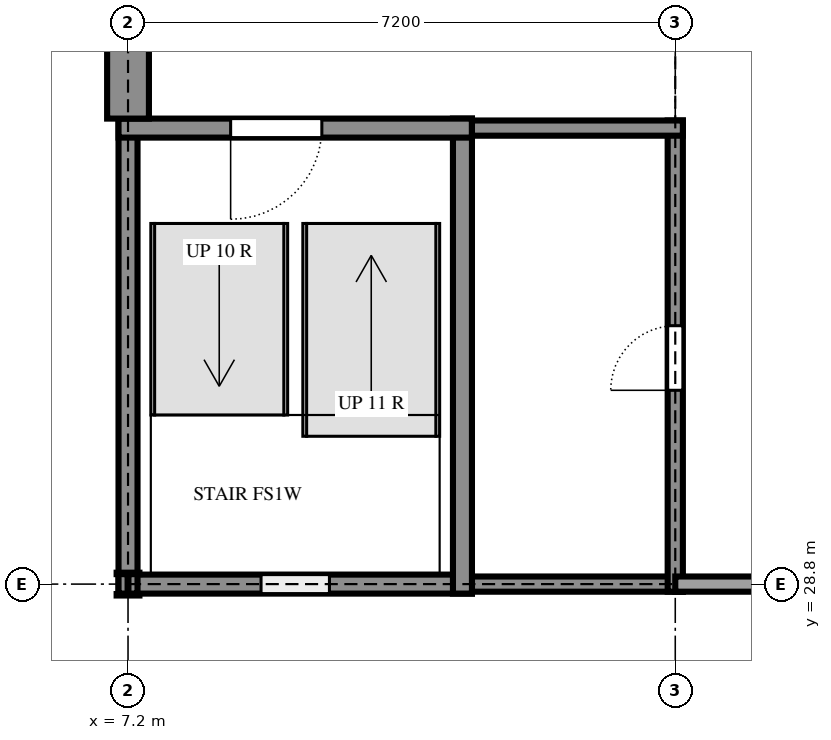
"""IFC4 building model, lengths in metres.
Left out: names, types, materials, properties, quantities, classifications, styles, units other than length and angle.
Written with IfcOpenShell. Run it as: python <this file> out.ifc"""

import sys

from ifc_helpers import new_model, si_unit, direction, frame, frame_2d, origin, origin_2d, place, context, subcontext, project, spatial, rectangle, i_section, extrude, element, fill, save


model = new_model("IFC4")
c1 = context("Model", 3, precision=1e-05, world=origin(), true_north=direction((0.0, 1.0)))
c2 = subcontext(c1, "Body", "Model", "MODEL_VIEW")
j1 = project(units=[si_unit("LENGTHUNIT", "METRE"), si_unit("PLANEANGLEUNIT", "RADIAN")], contexts=[c1])
p1 = place(None, origin())
s1 = spatial("IfcSite", under=j1, at=p1, CompositionType="ELEMENT")
p2 = place(p1, origin())
s2 = spatial("IfcBuilding", under=s1, at=p2, CompositionType="ELEMENT")
p3 = place(p2, frame((0.0, 0.0, 3.6)))
s3 = spatial("IfcBuildingStorey", under=s2, at=p3, CompositionType="ELEMENT", Elevation=3.6)
p4 = place(p3, frame((7.2, 28.8, 0.0), z_axis=(0.0, 0.0, 1.0), x_axis=(1.0, 0.0, 0.0)))
e1 = element("IfcColumn", 1, at=p4, inside=s3, PredefinedType="COLUMN", context=c2, shape_type="SweptSolid", body=[
    extrude(i_section(OverallWidth=0.3, OverallDepth=0.3, WebThickness=0.011, FlangeThickness=0.019, FilletRadius=0.027, at=origin_2d()), origin(), (0.0, 0.0, 1.0), 3.6),
])
p5 = place(p3, frame((7.075, 28.8, 0.0), z_axis=(0.0, 0.0, 1.0), x_axis=(1.0, 0.0, 0.0)))
e2 = element("IfcWall", 2, at=p5, inside=s3, PredefinedType="SHEAR", context=c2, shape_type="SweptSolid", body=[
    extrude(rectangle(XDim=4.65, YDim=0.25, at=frame_2d((2.325, 0.0))), origin(), (0.0, 0.0, 1.0), 3.6),
])
p6 = place(p5, frame((1.875, 0.0, 0.6)))
e3 = element("IfcOpeningElement", 3, at=p6, cuts=e2, PredefinedType="OPENING", context=c2, shape_type="SweptSolid", body=[
    extrude(rectangle(XDim=0.9, YDim=2.1, at=frame_2d((0.45, 1.05))), frame((0.0, 0.135, 0.0), z_axis=(0.0, -1.0, 0.0), x_axis=(1.0, 0.0, 0.0)), (0.0, 0.0, 1.0), 0.27),
])
p7 = place(p3, frame((11.725, 28.8, 0.0), z_axis=(0.0, 0.0, 1.0), x_axis=(1.0, 0.0, 0.0)))
e4 = element("IfcWall", 4, at=p7, inside=s3, PredefinedType="SHEAR", context=c2, shape_type="SweptSolid", body=[
    extrude(rectangle(XDim=2.775, YDim=0.2, at=frame_2d((1.387, 0.0))), origin(), (0.0, 0.0, 1.0), 3.6),
])
p8 = place(p3, frame((11.6, 28.675, 0.0), z_axis=(0.0, 0.0, 1.0), x_axis=(0.0, 1.0, 0.0)))
e5 = element("IfcWall", 5, at=p8, inside=s3, PredefinedType="SHEAR", context=c2, shape_type="SweptSolid", body=[
    extrude(rectangle(XDim=6.25, YDim=0.25, at=frame_2d((3.125, 0.0))), origin(), (0.0, 0.0, 1.0), 3.6),
])
p9 = place(p3, frame((14.4, 28.7, 0.0), z_axis=(0.0, 0.0, 1.0), x_axis=(0.0, 1.0, 0.0)))
e6 = element("IfcWall", 6, at=p9, inside=s3, PredefinedType="SHEAR", context=c2, shape_type="SweptSolid", body=[
    extrude(rectangle(XDim=6.2, YDim=0.2, at=frame_2d((3.1, 0.0))), origin(), (0.0, 0.0, 1.0), 3.6),
])
p10 = place(p9, frame((2.65, 0.0, 0.0)))
e7 = element("IfcOpeningElement", 7, at=p10, cuts=e6, PredefinedType="OPENING", context=c2, shape_type="SweptSolid", body=[
    extrude(rectangle(XDim=0.85, YDim=2.1, at=frame_2d((0.425, 1.05))), frame((0.0, 0.11, 0.0), z_axis=(0.0, -1.0, 0.0), x_axis=(1.0, 0.0, 0.0)), (0.0, 0.0, 1.0), 0.22),
])
p11 = place(p3, frame((7.2, 34.925, 0.0), z_axis=(0.0, 0.0, 1.0), x_axis=(0.0, -1.0, 0.0)))
e8 = element("IfcWall", 8, at=p11, inside=s3, PredefinedType="SHEAR", context=c2, shape_type="SweptSolid", body=[
    extrude(rectangle(XDim=6.25, YDim=0.25, at=frame_2d((3.125, 0.0))), origin(), (0.0, 0.0, 1.0), 3.6),
])
p12 = place(p3, frame((11.725, 34.8, 0.0), z_axis=(0.0, 0.0, 1.0), x_axis=(-1.0, 0.0, 0.0)))
e9 = element("IfcWall", 9, at=p12, inside=s3, PredefinedType="SHEAR", context=c2, shape_type="SweptSolid", body=[
    extrude(rectangle(XDim=4.65, YDim=0.25, at=frame_2d((2.325, 0.0))), origin(), (0.0, 0.0, 1.0), 3.6),
])
p13 = place(p12, frame((1.975, 0.0, 0.0)))
e10 = element("IfcOpeningElement", 10, at=p13, cuts=e9, PredefinedType="OPENING", context=c2, shape_type="SweptSolid", body=[
    extrude(rectangle(XDim=1.2, YDim=2.4, at=frame_2d((0.6, 1.2))), frame((0.0, 0.135, 0.0), z_axis=(0.0, -1.0, 0.0), x_axis=(1.0, 0.0, 0.0)), (0.0, 0.0, 1.0), 0.27),
])
p14 = place(p3, frame((14.5, 34.8, 0.0), z_axis=(0.0, 0.0, 1.0), x_axis=(-1.0, 0.0, 0.0)))
e11 = element("IfcWall", 11, at=p14, inside=s3, PredefinedType="SHEAR", context=c2, shape_type="SweptSolid", body=[
    extrude(rectangle(XDim=2.775, YDim=0.2, at=frame_2d((1.387, 0.0))), origin(), (0.0, 0.0, 1.0), 3.6),
])
p15 = place(p3, frame((7.2, 34.925, 0.0), z_axis=(0.0, 0.0, 1.0), x_axis=(0.0, 1.0, 0.0)))
e12 = element("IfcWall", 12, at=p15, inside=s3, PredefinedType="SOLIDWALL", context=c2, shape_type="SweptSolid", body=[
    extrude(rectangle(XDim=1.225, YDim=0.55, at=frame_2d((0.612, 0.0))), origin(), (0.0, 0.0, 1.0), 3.6),
])
p16 = place(p6, origin())
e13 = element("IfcWindow", 13, at=p16, inside=s3, PartitioningType="SINGLE_PANEL", PredefinedType="WINDOW", context=c2, shape_type="SweptSolid", body=[
    extrude(rectangle(XDim=0.9, YDim=2.1, at=frame_2d((0.45, 1.05))), frame((0.0, 0.03, 0.0), z_axis=(0.0, -1.0, 0.0), x_axis=(1.0, 0.0, 0.0)), (0.0, 0.0, 1.0), 0.06),
])
fill(e3, e13)
p17 = place(p13, origin())
e14 = element("IfcDoor", 14, at=p17, inside=s3, OperationType="SINGLE_SWING_LEFT", PredefinedType="DOOR", context=c2, shape_type="SweptSolid", body=[
    extrude(rectangle(XDim=1.2, YDim=2.4, at=frame_2d((0.6, 1.2))), frame((0.0, 0.025, 0.0), z_axis=(0.0, -1.0, 0.0), x_axis=(1.0, 0.0, 0.0)), (0.0, 0.0, 1.0), 0.05),
])
fill(e10, e14)
p18 = place(p10, origin())
e15 = element("IfcDoor", 15, at=p18, inside=s3, OperationType="SINGLE_SWING_RIGHT", PredefinedType="DOOR", context=c2, shape_type="SweptSolid", body=[
    extrude(rectangle(XDim=0.85, YDim=2.1, at=frame_2d((0.425, 1.05))), frame((0.0, 0.025, 0.0), z_axis=(0.0, -1.0, 0.0), x_axis=(1.0, 0.0, 0.0)), (0.0, 0.0, 1.0), 0.05),
])
fill(e7, e15)
save(model, sys.argv[1])
